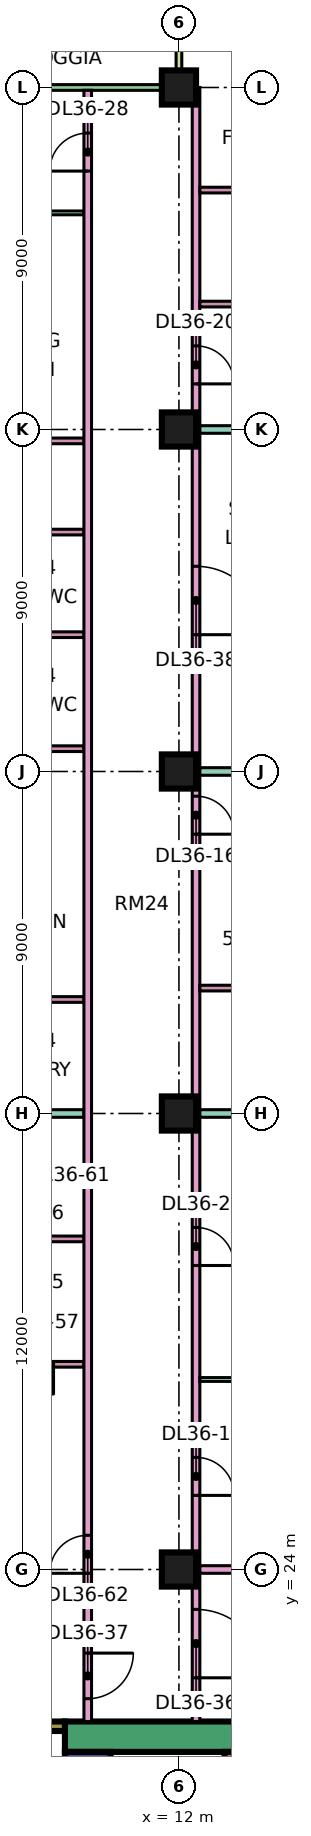
"""IFC4 building model, lengths in metres.
Left out: names, types, materials, properties, quantities, classifications, styles, units other than length and angle.
Written with IfcOpenShell. Run it as: python <this file> out.ifc"""

import sys

from ifc_helpers import new_model, si_unit, direction, frame, frame_2d, origin, origin_2d, place, context, subcontext, project, spatial, rectangle, extrude, element, fill, save


model = new_model("IFC4")
c1 = context("Model", 3, precision=1e-05, world=origin(), true_north=direction((0.0, 1.0)))
c2 = subcontext(c1, "Body", "Model", "MODEL_VIEW")
j1 = project(units=[si_unit("LENGTHUNIT", "METRE"), si_unit("PLANEANGLEUNIT", "RADIAN")], contexts=[c1])
p1 = place(None, origin())
s1 = spatial("IfcSite", under=j1, at=p1, CompositionType="ELEMENT")
p2 = place(p1, origin())
s2 = spatial("IfcBuilding", under=s1, at=p2, CompositionType="ELEMENT")
p3 = place(p2, frame((0.0, 0.0, 161.15)))
s3 = spatial("IfcBuildingStorey", under=s2, at=p3, CompositionType="ELEMENT", Elevation=161.15)
for number, where, z_axis, x_axis in (
    (1, (12.0, 24.0, 0.0), (0.0, 0.0, 1.0), (1.0, 0.0, 0.0)),
    (2, (12.0, 36.0, 0.0), (0.0, 0.0, 1.0), (1.0, 0.0, 0.0)),
    (3, (12.0, 45.0, 0.0), (0.0, 0.0, 1.0), (1.0, 0.0, 0.0)),
    (4, (12.0, 54.0, 0.0), (0.0, 0.0, 1.0), (1.0, 0.0, 0.0)),
    (5, (12.0, 63.0, 0.0), (0.0, 0.0, 1.0), (1.0, 0.0, 0.0)),
):
    element("IfcColumn", number, at=place(p3, frame(where, z_axis=z_axis, x_axis=x_axis)), inside=s3, PredefinedType="COLUMN", context=c2, shape_type="SweptSolid", body=[
        extrude(rectangle(XDim=0.9, YDim=0.9, at=origin_2d()), origin(), (0.0, 0.0, 1.0), 3.75),
    ])
p4 = place(p3, frame((9.0, 19.6, 0.0), z_axis=(0.0, 0.0, 1.0), x_axis=(1.0, 0.0, 0.0)))
e6 = element("IfcWall", 6, at=p4, inside=s3, PredefinedType="SHEAR", context=c2, shape_type="SweptSolid", body=[
    extrude(rectangle(XDim=25.0, YDim=0.8, at=frame_2d((12.5, 0.0))), origin(), (0.0, 0.0, 1.0), 3.75),
])
p5 = place(p4, frame((19.1, 0.0, 0.0)))
e7 = element("IfcOpeningElement", 7, at=p5, cuts=e6, PredefinedType="OPENING", context=c2, shape_type="SweptSolid", body=[
    extrude(rectangle(XDim=1.8, YDim=2.4, at=frame_2d((0.9, 1.2))), frame((0.0, 0.41, 0.0), z_axis=(0.0, -1.0, 0.0), x_axis=(1.0, 0.0, 0.0)), (0.0, 0.0, 1.0), 0.82),
])
p6 = place(p3, frame((9.6, 7.8, 0.0), z_axis=(0.0, 0.0, 1.0), x_axis=(0.0, 1.0, 0.0)))
e8 = element("IfcWall", 8, at=p6, inside=s3, PredefinedType="SHEAR", context=c2, shape_type="SweptSolid", body=[
    extrude(rectangle(XDim=11.4, YDim=1.2, at=frame_2d((5.7, 0.0))), origin(), (0.0, 0.0, 1.0), 3.75),
])
p7 = place(p6, frame((4.075, 0.0, 0.0)))
e9 = element("IfcOpeningElement", 9, at=p7, cuts=e8, PredefinedType="OPENING", context=c2, shape_type="SweptSolid", body=[
    extrude(rectangle(XDim=1.1, YDim=2.2, at=frame_2d((0.55, 1.1))), frame((0.0, 0.61, 0.0), z_axis=(0.0, -1.0, 0.0), x_axis=(1.0, 0.0, 0.0)), (0.0, 0.0, 1.0), 1.22),
])
p8 = place(p6, frame((6.575, 0.0, 0.0)))
e10 = element("IfcOpeningElement", 10, at=p8, cuts=e8, PredefinedType="OPENING", context=c2, shape_type="SweptSolid", body=[
    extrude(rectangle(XDim=1.1, YDim=2.2, at=frame_2d((0.55, 1.1))), frame((0.0, 0.61, 0.0), z_axis=(0.0, -1.0, 0.0), x_axis=(1.0, 0.0, 0.0)), (0.0, 0.0, 1.0), 1.22),
])
p9 = place(p6, frame((9.4, 0.0, 0.0)))
e11 = element("IfcOpeningElement", 11, at=p9, cuts=e8, PredefinedType="OPENING", context=c2, shape_type="SweptSolid", body=[
    extrude(rectangle(XDim=1.1, YDim=2.2, at=frame_2d((0.55, 1.1))), frame((0.0, 0.61, 0.0), z_axis=(0.0, -1.0, 0.0), x_axis=(1.0, 0.0, 0.0)), (0.0, 0.0, 1.0), 1.22),
])
p10 = place(p6, frame((1.75, 0.0, 0.0)))
e12 = element("IfcOpeningElement", 12, at=p10, cuts=e8, PredefinedType="OPENING", context=c2, shape_type="SweptSolid", body=[
    extrude(rectangle(XDim=0.9, YDim=2.1, at=frame_2d((0.45, 1.05))), frame((0.0, 0.61, 0.0), z_axis=(0.0, -1.0, 0.0), x_axis=(1.0, 0.0, 0.0)), (0.0, 0.0, 1.0), 1.22),
])
p11 = place(p3, frame((13.325, 7.8, 0.0), z_axis=(0.0, 0.0, 1.0), x_axis=(0.0, 1.0, 0.0)))
e13 = element("IfcWall", 13, at=p11, inside=s3, PredefinedType="SHEAR", context=c2, shape_type="SweptSolid", body=[
    extrude(rectangle(XDim=11.4, YDim=0.25, at=frame_2d((5.7, 0.0))), origin(), (0.0, 0.0, 1.0), 3.75),
])
p12 = place(p3, frame((2.1, 19.875, 0.0), z_axis=(0.0, 0.0, 1.0), x_axis=(1.0, 0.0, 0.0)))
e14 = element("IfcWall", 14, at=p12, inside=s3, PredefinedType="SHEAR", context=c2, shape_type="SweptSolid", body=[
    extrude(rectangle(XDim=6.9, YDim=0.25, at=frame_2d((3.45, 0.0))), origin(), (0.0, 0.0, 1.0), 3.75),
])
p13 = place(p12, frame((1.175, 0.0, 0.0)))
e15 = element("IfcOpeningElement", 15, at=p13, cuts=e14, PredefinedType="OPENING", context=c2, shape_type="SweptSolid", body=[
    extrude(rectangle(XDim=1.1, YDim=2.2, at=frame_2d((0.55, 1.1))), frame((0.0, 0.135, 0.0), z_axis=(0.0, -1.0, 0.0), x_axis=(1.0, 0.0, 0.0)), (0.0, 0.0, 1.0), 0.27),
])
p14 = place(p12, frame((4.6, 0.0, 0.0)))
e16 = element("IfcOpeningElement", 16, at=p14, cuts=e14, PredefinedType="OPENING", context=c2, shape_type="SweptSolid", body=[
    extrude(rectangle(XDim=1.2, YDim=2.2, at=frame_2d((0.6, 1.1))), frame((0.0, 0.135, 0.0), z_axis=(0.0, -1.0, 0.0), x_axis=(1.0, 0.0, 0.0)), (0.0, 0.0, 1.0), 0.27),
])
p15 = place(p3, frame((11.925, 63.0, 0.0), z_axis=(0.0, 0.0, 1.0), x_axis=(-1.0, 0.0, 0.0)))
e17 = element("IfcWall", 17, at=p15, inside=s3, PredefinedType="SOLIDWALL", context=c2, shape_type="SweptSolid", body=[
    extrude(rectangle(XDim=10.35, YDim=0.15, at=frame_2d((5.175, 0.0))), origin(), (0.0, 0.0, 1.0), 3.35),
])
p16 = place(p15, frame((7.688, 0.0, 0.0)))
e18 = element("IfcOpeningElement", 18, at=p16, cuts=e17, PredefinedType="OPENING", context=c2, shape_type="SweptSolid", body=[
    extrude(rectangle(XDim=1.8, YDim=2.4, at=frame_2d((0.9, 1.2))), frame((0.0, 0.085, 0.0), z_axis=(0.0, -1.0, 0.0), x_axis=(1.0, 0.0, 0.0)), (0.0, 0.0, 1.0), 0.17),
])
p17 = place(p3, frame((12.0, 64.5, 0.0), z_axis=(0.0, 0.0, 1.0), x_axis=(0.0, -1.0, 0.0)))
e19 = element("IfcWall", 19, at=p17, inside=s3, PredefinedType="SOLIDWALL", context=c2, shape_type="SweptSolid", body=[
    extrude(rectangle(XDim=1.5, YDim=0.15, at=frame_2d((0.75, 0.0))), origin(), (0.0, 0.0, 1.0), 3.35),
])
p18 = place(p3, frame((-1.35, 22.4, 0.0), z_axis=(0.0, 0.0, 1.0), x_axis=(1.0, 0.0, 0.0)))
e20 = element("IfcWall", 20, at=p18, inside=s3, PredefinedType="PARTITIONING", context=c2, shape_type="SweptSolid", body=[
    extrude(rectangle(XDim=10.85, YDim=0.2, at=frame_2d((5.425, 0.0))), origin(), (0.0, 0.0, 1.0), 3.35),
])
p19 = place(p3, frame((0.0, 36.0, 0.0), z_axis=(0.0, 0.0, 1.0), x_axis=(1.0, 0.0, 0.0)))
e21 = element("IfcWall", 21, at=p19, inside=s3, PredefinedType="PARTITIONING", context=c2, shape_type="SweptSolid", body=[
    extrude(rectangle(XDim=9.5, YDim=0.2, at=frame_2d((4.75, 0.0))), origin(), (0.0, 0.0, 1.0), 3.35),
])
for number, where, z_axis, x_axis in (
    (22, (6.375, 39.0, 0.0), (0.0, 0.0, 1.0), (1.0, 0.0, 0.0)),
    (23, (6.375, 45.6, 0.0), (0.0, 0.0, 1.0), (1.0, 0.0, 0.0)),
    (24, (6.375, 48.6, 0.0), (0.0, 0.0, 1.0), (1.0, 0.0, 0.0)),
    (25, (6.375, 51.3, 0.0), (0.0, 0.0, 1.0), (1.0, 0.0, 0.0)),
    (26, (6.375, 53.7, 0.0), (0.0, 0.0, 1.0), (1.0, 0.0, 0.0)),
):
    element("IfcWall", number, at=place(p3, frame(where, z_axis=z_axis, x_axis=x_axis)), inside=s3, PredefinedType="PARTITIONING", context=c2, shape_type="SweptSolid", body=[
        extrude(rectangle(XDim=3.125, YDim=0.15, at=frame_2d((1.562, 0.0))), origin(), (0.0, 0.0, 1.0), 3.35),
    ])
p20 = place(p3, frame((6.375, 59.7, 0.0), z_axis=(0.0, 0.0, 1.0), x_axis=(1.0, 0.0, 0.0)))
e27 = element("IfcWall", 27, at=p20, inside=s3, PredefinedType="PARTITIONING", context=c2, shape_type="SweptSolid", body=[
    extrude(rectangle(XDim=3.125, YDim=0.1, at=frame_2d((1.562, 0.0))), origin(), (0.0, 0.0, 1.0), 3.35),
])
p21 = place(p20, frame((1.125, 0.0, 0.0)))
e28 = element("IfcOpeningElement", 28, at=p21, cuts=e27, PredefinedType="OPENING", context=c2, shape_type="SweptSolid", body=[
    extrude(rectangle(XDim=0.9, YDim=2.1, at=frame_2d((0.45, 1.05))), frame((0.0, 0.06, 0.0), z_axis=(0.0, -1.0, 0.0), x_axis=(1.0, 0.0, 0.0)), (0.0, 0.0, 1.0), 0.12),
])
p22 = place(p3, frame((6.975, 29.4, 0.0), z_axis=(0.0, 0.0, 1.0), x_axis=(1.0, 0.0, 0.0)))
e29 = element("IfcWall", 29, at=p22, inside=s3, PredefinedType="PARTITIONING", context=c2, shape_type="SweptSolid", body=[
    extrude(rectangle(XDim=2.525, YDim=0.15, at=frame_2d((1.262, 0.0))), origin(), (0.0, 0.0, 1.0), 3.35),
])
p23 = place(p22, frame((0.925, 0.0, 0.0)))
e30 = element("IfcOpeningElement", 30, at=p23, cuts=e29, PredefinedType="OPENING", context=c2, shape_type="SweptSolid", body=[
    extrude(rectangle(XDim=0.8, YDim=2.1, at=frame_2d((0.4, 1.05))), frame((0.0, 0.085, 0.0), z_axis=(0.0, -1.0, 0.0), x_axis=(1.0, 0.0, 0.0)), (0.0, 0.0, 1.0), 0.17),
])
p24 = place(p3, frame((6.975, 32.7, 0.0), z_axis=(0.0, 0.0, 1.0), x_axis=(1.0, 0.0, 0.0)))
e31 = element("IfcWall", 31, at=p24, inside=s3, PredefinedType="PARTITIONING", context=c2, shape_type="SweptSolid", body=[
    extrude(rectangle(XDim=2.525, YDim=0.15, at=frame_2d((1.262, 0.0))), origin(), (0.0, 0.0, 1.0), 3.35),
])
p25 = place(p3, frame((9.6, 20.0, 0.0), z_axis=(0.0, 0.0, 1.0), x_axis=(0.0, 1.0, 0.0)))
e32 = element("IfcWall", 32, at=p25, inside=s3, PredefinedType="PARTITIONING", context=c2, shape_type="SweptSolid", body=[
    extrude(rectangle(XDim=42.926, YDim=0.2, at=frame_2d((21.463, 0.0))), origin(), (0.0, 0.0, 1.0), 3.35),
])
p26 = place(p25, frame((40.8, 0.0, 0.0)))
e33 = element("IfcOpeningElement", 33, at=p26, cuts=e32, PredefinedType="OPENING", context=c2, shape_type="SweptSolid", body=[
    extrude(rectangle(XDim=1.0, YDim=2.1, at=frame_2d((0.5, 1.05))), frame((0.0, 0.11, 0.0), z_axis=(0.0, -1.0, 0.0), x_axis=(1.0, 0.0, 0.0)), (0.0, 0.0, 1.0), 0.22),
])
p27 = place(p25, frame((0.6, 0.0, 0.0)))
e34 = element("IfcOpeningElement", 34, at=p27, cuts=e32, PredefinedType="OPENING", context=c2, shape_type="SweptSolid", body=[
    extrude(rectangle(XDim=1.2, YDim=2.1, at=frame_2d((0.6, 1.05))), frame((0.0, 0.11, 0.0), z_axis=(0.0, -1.0, 0.0), x_axis=(1.0, 0.0, 0.0)), (0.0, 0.0, 1.0), 0.22),
])
p28 = place(p25, frame((3.9, 0.0, 0.0)))
e35 = element("IfcOpeningElement", 35, at=p28, cuts=e32, PredefinedType="OPENING", context=c2, shape_type="SweptSolid", body=[
    extrude(rectangle(XDim=1.0, YDim=2.1, at=frame_2d((0.5, 1.05))), frame((0.0, 0.11, 0.0), z_axis=(0.0, -1.0, 0.0), x_axis=(1.0, 0.0, 0.0)), (0.0, 0.0, 1.0), 0.22),
])
p29 = place(p3, frame((12.45, 20.0, 0.0), z_axis=(0.0, 0.0, 1.0), x_axis=(0.0, 1.0, 0.0)))
e36 = element("IfcWall", 36, at=p29, inside=s3, PredefinedType="PARTITIONING", context=c2, shape_type="SweptSolid", body=[
    extrude(rectangle(XDim=43.0, YDim=0.2, at=frame_2d((21.5, 0.0))), origin(), (0.0, 0.0, 1.0), 3.35),
])
p30 = place(p29, frame((5.95, 0.0, 0.0)))
e37 = element("IfcOpeningElement", 37, at=p30, cuts=e36, PredefinedType="OPENING", context=c2, shape_type="SweptSolid", body=[
    extrude(rectangle(XDim=1.0, YDim=2.1, at=frame_2d((0.5, 1.05))), frame((0.0, 0.11, 0.0), z_axis=(0.0, -1.0, 0.0), x_axis=(1.0, 0.0, 0.0)), (0.0, 0.0, 1.0), 0.22),
])
p31 = place(p29, frame((12.0, 0.0, 0.0)))
e38 = element("IfcOpeningElement", 38, at=p31, cuts=e36, PredefinedType="OPENING", context=c2, shape_type="SweptSolid", body=[
    extrude(rectangle(XDim=1.0, YDim=2.1, at=frame_2d((0.5, 1.05))), frame((0.0, 0.11, 0.0), z_axis=(0.0, -1.0, 0.0), x_axis=(1.0, 0.0, 0.0)), (0.0, 0.0, 1.0), 0.22),
])
p32 = place(p29, frame((23.35, 0.0, 0.0)))
e39 = element("IfcOpeningElement", 39, at=p32, cuts=e36, PredefinedType="OPENING", context=c2, shape_type="SweptSolid", body=[
    extrude(rectangle(XDim=1.0, YDim=2.1, at=frame_2d((0.5, 1.05))), frame((0.0, 0.11, 0.0), z_axis=(0.0, -1.0, 0.0), x_axis=(1.0, 0.0, 0.0)), (0.0, 0.0, 1.0), 0.22),
])
p33 = place(p29, frame((35.2, 0.0, 0.0)))
e40 = element("IfcOpeningElement", 40, at=p33, cuts=e36, PredefinedType="OPENING", context=c2, shape_type="SweptSolid", body=[
    extrude(rectangle(XDim=1.0, YDim=2.1, at=frame_2d((0.5, 1.05))), frame((0.0, 0.11, 0.0), z_axis=(0.0, -1.0, 0.0), x_axis=(1.0, 0.0, 0.0)), (0.0, 0.0, 1.0), 0.22),
])
p34 = place(p29, frame((1.15, 0.0, 0.0)))
e41 = element("IfcOpeningElement", 41, at=p34, cuts=e36, PredefinedType="OPENING", context=c2, shape_type="SweptSolid", body=[
    extrude(rectangle(XDim=1.8, YDim=2.1, at=frame_2d((0.9, 1.05))), frame((0.0, 0.11, 0.0), z_axis=(0.0, -1.0, 0.0), x_axis=(1.0, 0.0, 0.0)), (0.0, 0.0, 1.0), 0.22),
])
p35 = place(p29, frame((28.6, 0.0, 0.0)))
e42 = element("IfcOpeningElement", 42, at=p35, cuts=e36, PredefinedType="OPENING", context=c2, shape_type="SweptSolid", body=[
    extrude(rectangle(XDim=1.8, YDim=2.1, at=frame_2d((0.9, 1.05))), frame((0.0, 0.11, 0.0), z_axis=(0.0, -1.0, 0.0), x_axis=(1.0, 0.0, 0.0)), (0.0, 0.0, 1.0), 0.22),
])
p36 = place(p3, frame((12.55, 24.0, 0.0), z_axis=(0.0, 0.0, 1.0), x_axis=(1.0, 0.0, 0.0)))
e43 = element("IfcWall", 43, at=p36, inside=s3, PredefinedType="PARTITIONING", context=c2, shape_type="SweptSolid", body=[
    extrude(rectangle(XDim=8.95, YDim=0.2, at=frame_2d((4.475, 0.0))), origin(), (0.0, 0.0, 1.0), 3.35),
])
p37 = place(p3, frame((12.55, 29.0, 0.0), z_axis=(0.0, 0.0, 1.0), x_axis=(1.0, 0.0, 0.0)))
e44 = element("IfcWall", 44, at=p37, inside=s3, PredefinedType="PARTITIONING", context=c2, shape_type="SweptSolid", body=[
    extrude(rectangle(XDim=8.95, YDim=0.1, at=frame_2d((4.475, 0.0))), origin(), (0.0, 0.0, 1.0), 3.35),
])
p38 = place(p3, frame((12.55, 36.0, 0.0), z_axis=(0.0, 0.0, 1.0), x_axis=(1.0, 0.0, 0.0)))
e45 = element("IfcWall", 45, at=p38, inside=s3, PredefinedType="PARTITIONING", context=c2, shape_type="SweptSolid", body=[
    extrude(rectangle(XDim=11.45, YDim=0.2, at=frame_2d((5.725, 0.0))), origin(), (0.0, 0.0, 1.0), 3.35),
])
p39 = place(p3, frame((12.55, 39.3, 0.0), z_axis=(0.0, 0.0, 1.0), x_axis=(1.0, 0.0, 0.0)))
e46 = element("IfcWall", 46, at=p39, inside=s3, PredefinedType="PARTITIONING", context=c2, shape_type="SweptSolid", body=[
    extrude(rectangle(XDim=4.625, YDim=0.15, at=frame_2d((2.312, 0.0))), origin(), (0.0, 0.0, 1.0), 3.35),
])
p40 = place(p3, frame((12.55, 42.6, 0.0), z_axis=(0.0, 0.0, 1.0), x_axis=(1.0, 0.0, 0.0)))
e47 = element("IfcWall", 47, at=p40, inside=s3, PredefinedType="PARTITIONING", context=c2, shape_type="SweptSolid", body=[
    extrude(rectangle(XDim=4.625, YDim=0.15, at=frame_2d((2.312, 0.0))), origin(), (0.0, 0.0, 1.0), 3.35),
])
p41 = place(p40, frame((1.85, 0.0, 0.0)))
e48 = element("IfcOpeningElement", 48, at=p41, cuts=e47, PredefinedType="OPENING", context=c2, shape_type="SweptSolid", body=[
    extrude(rectangle(XDim=0.8, YDim=2.1, at=frame_2d((0.4, 1.05))), frame((0.0, 0.085, 0.0), z_axis=(0.0, -1.0, 0.0), x_axis=(1.0, 0.0, 0.0)), (0.0, 0.0, 1.0), 0.17),
])
p42 = place(p3, frame((12.55, 45.0, 0.0), z_axis=(0.0, 0.0, 1.0), x_axis=(1.0, 0.0, 0.0)))
e49 = element("IfcWall", 49, at=p42, inside=s3, PredefinedType="PARTITIONING", context=c2, shape_type="SweptSolid", body=[
    extrude(rectangle(XDim=11.45, YDim=0.2, at=frame_2d((5.725, 0.0))), origin(), (0.0, 0.0, 1.0), 3.35),
])
p43 = place(p3, frame((12.55, 54.0, 0.0), z_axis=(0.0, 0.0, 1.0), x_axis=(1.0, 0.0, 0.0)))
e50 = element("IfcWall", 50, at=p43, inside=s3, PredefinedType="PARTITIONING", context=c2, shape_type="SweptSolid", body=[
    extrude(rectangle(XDim=11.376, YDim=0.2, at=frame_2d((5.688, 0.0))), origin(), (0.0, 0.0, 1.0), 3.35),
])
for number, where, z_axis, x_axis in (
    (51, (12.55, 57.3, 0.0), (0.0, 0.0, 1.0), (1.0, 0.0, 0.0)),
    (52, (12.55, 60.3, 0.0), (0.0, 0.0, 1.0), (1.0, 0.0, 0.0)),
):
    element("IfcWall", number, at=place(p3, frame(where, z_axis=z_axis, x_axis=x_axis)), inside=s3, PredefinedType="PARTITIONING", context=c2, shape_type="SweptSolid", body=[
        extrude(rectangle(XDim=5.225, YDim=0.15, at=frame_2d((2.612, 0.0))), origin(), (0.0, 0.0, 1.0), 3.35),
    ])
p44 = place(p30, frame((1.0, 0.0, 0.0), z_axis=(0.0, 0.0, 1.0), x_axis=(-1.0, 0.0, 0.0)))
e53 = element("IfcDoor", 53, at=p44, inside=s3, OperationType="SINGLE_SWING_LEFT", PredefinedType="DOOR", context=c2, shape_type="SweptSolid", body=[
    extrude(rectangle(XDim=1.0, YDim=2.1, at=frame_2d((0.5, 1.05))), frame((0.0, 0.025, 0.0), z_axis=(0.0, -1.0, 0.0), x_axis=(1.0, 0.0, 0.0)), (0.0, 0.0, 1.0), 0.05),
])
fill(e37, e53)
p45 = place(p31, frame((1.0, 0.0, 0.0), z_axis=(0.0, 0.0, 1.0), x_axis=(-1.0, 0.0, 0.0)))
e54 = element("IfcDoor", 54, at=p45, inside=s3, OperationType="SINGLE_SWING_LEFT", PredefinedType="DOOR", context=c2, shape_type="SweptSolid", body=[
    extrude(rectangle(XDim=1.0, YDim=2.1, at=frame_2d((0.5, 1.05))), frame((0.0, 0.025, 0.0), z_axis=(0.0, -1.0, 0.0), x_axis=(1.0, 0.0, 0.0)), (0.0, 0.0, 1.0), 0.05),
])
fill(e38, e54)
p46 = place(p32, frame((1.0, 0.0, 0.0), z_axis=(0.0, 0.0, 1.0), x_axis=(-1.0, 0.0, 0.0)))
e55 = element("IfcDoor", 55, at=p46, inside=s3, OperationType="SINGLE_SWING_LEFT", PredefinedType="DOOR", context=c2, shape_type="SweptSolid", body=[
    extrude(rectangle(XDim=1.0, YDim=2.1, at=frame_2d((0.5, 1.05))), frame((0.0, 0.025, 0.0), z_axis=(0.0, -1.0, 0.0), x_axis=(1.0, 0.0, 0.0)), (0.0, 0.0, 1.0), 0.05),
])
fill(e39, e55)
p47 = place(p33, frame((1.0, 0.0, 0.0), z_axis=(0.0, 0.0, 1.0), x_axis=(-1.0, 0.0, 0.0)))
e56 = element("IfcDoor", 56, at=p47, inside=s3, OperationType="SINGLE_SWING_LEFT", PredefinedType="DOOR", context=c2, shape_type="SweptSolid", body=[
    extrude(rectangle(XDim=1.0, YDim=2.1, at=frame_2d((0.5, 1.05))), frame((0.0, 0.025, 0.0), z_axis=(0.0, -1.0, 0.0), x_axis=(1.0, 0.0, 0.0)), (0.0, 0.0, 1.0), 0.05),
])
fill(e40, e56)
p48 = place(p26, origin())
e57 = element("IfcDoor", 57, at=p48, inside=s3, OperationType="SINGLE_SWING_LEFT", PredefinedType="DOOR", context=c2, shape_type="SweptSolid", body=[
    extrude(rectangle(XDim=1.0, YDim=2.1, at=frame_2d((0.5, 1.05))), frame((0.0, 0.025, 0.0), z_axis=(0.0, -1.0, 0.0), x_axis=(1.0, 0.0, 0.0)), (0.0, 0.0, 1.0), 0.05),
])
fill(e33, e57)
p49 = place(p34, frame((1.8, 0.0, 0.0), z_axis=(0.0, 0.0, 1.0), x_axis=(-1.0, 0.0, 0.0)))
e58 = element("IfcDoor", 58, at=p49, inside=s3, OperationType="DOUBLE_DOOR_SINGLE_SWING", PredefinedType="DOOR", context=c2, shape_type="SweptSolid", body=[
    extrude(rectangle(XDim=1.8, YDim=2.1, at=frame_2d((0.9, 1.05))), frame((0.0, 0.025, 0.0), z_axis=(0.0, -1.0, 0.0), x_axis=(1.0, 0.0, 0.0)), (0.0, 0.0, 1.0), 0.05),
])
fill(e41, e58)
p50 = place(p27, origin())
e59 = element("IfcDoor", 59, at=p50, inside=s3, OperationType="SINGLE_SWING_RIGHT", PredefinedType="DOOR", context=c2, shape_type="SweptSolid", body=[
    extrude(rectangle(XDim=1.2, YDim=2.1, at=frame_2d((0.6, 1.05))), frame((0.0, 0.025, 0.0), z_axis=(0.0, -1.0, 0.0), x_axis=(1.0, 0.0, 0.0)), (0.0, 0.0, 1.0), 0.05),
])
fill(e34, e59)
p51 = place(p35, frame((1.8, 0.0, 0.0), z_axis=(0.0, 0.0, 1.0), x_axis=(-1.0, 0.0, 0.0)))
e60 = element("IfcDoor", 60, at=p51, inside=s3, OperationType="DOUBLE_DOOR_SINGLE_SWING", PredefinedType="DOOR", context=c2, shape_type="SweptSolid", body=[
    extrude(rectangle(XDim=1.8, YDim=2.1, at=frame_2d((0.9, 1.05))), frame((0.0, 0.025, 0.0), z_axis=(0.0, -1.0, 0.0), x_axis=(1.0, 0.0, 0.0)), (0.0, 0.0, 1.0), 0.05),
])
fill(e42, e60)
p52 = place(p23, origin())
e61 = element("IfcDoor", 61, at=p52, inside=s3, OperationType="SINGLE_SWING_RIGHT", PredefinedType="DOOR", context=c2, shape_type="SweptSolid", body=[
    extrude(rectangle(XDim=0.8, YDim=2.1, at=frame_2d((0.4, 1.05))), frame((0.0, 0.025, 0.0), z_axis=(0.0, -1.0, 0.0), x_axis=(1.0, 0.0, 0.0)), (0.0, 0.0, 1.0), 0.05),
])
fill(e30, e61)
p53 = place(p28, origin())
e62 = element("IfcDoor", 62, at=p53, inside=s3, OperationType="SINGLE_SWING_LEFT", PredefinedType="DOOR", context=c2, shape_type="SweptSolid", body=[
    extrude(rectangle(XDim=1.0, YDim=2.1, at=frame_2d((0.5, 1.05))), frame((0.0, 0.025, 0.0), z_axis=(0.0, -1.0, 0.0), x_axis=(1.0, 0.0, 0.0)), (0.0, 0.0, 1.0), 0.05),
])
fill(e35, e62)
save(model, sys.argv[1])
